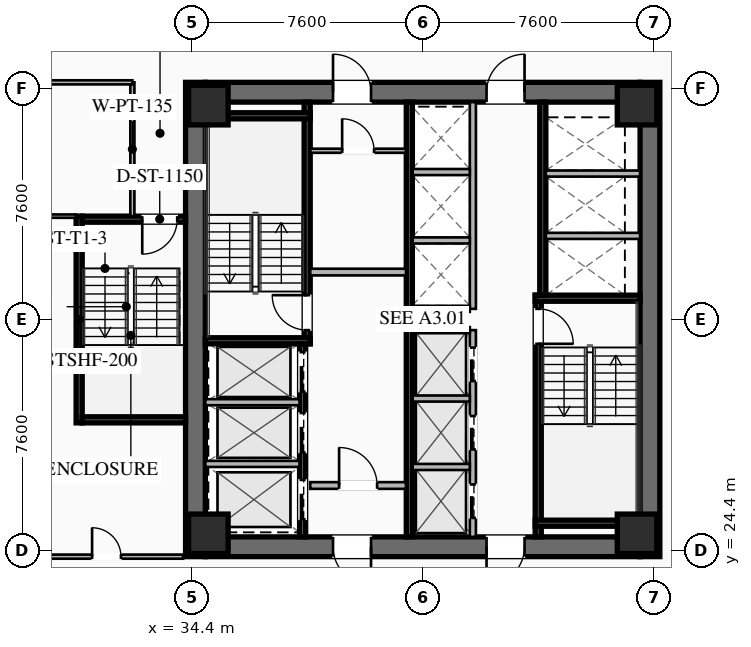
"""IFC4 building model, lengths in metres.
Left out: names, types, materials, properties, quantities, classifications, styles, units other than length and angle.
Written with IfcOpenShell. Run it as: python <this file> out.ifc"""

import sys

from ifc_helpers import new_model, si_unit, direction, frame, frame_2d, origin, origin_2d, place, context, subcontext, project, spatial, rectangle, hollow_rectangle, extrude, element, fill, save


model = new_model("IFC4")
c1 = context("Model", 3, precision=1e-05, world=origin(), true_north=direction((0.0, 1.0)))
c2 = subcontext(c1, "Body", "Model", "MODEL_VIEW")
j1 = project(units=[si_unit("LENGTHUNIT", "METRE"), si_unit("PLANEANGLEUNIT", "RADIAN")], contexts=[c1])
p1 = place(None, origin())
s1 = spatial("IfcSite", under=j1, at=p1, CompositionType="ELEMENT")
p2 = place(p1, origin())
s2 = spatial("IfcBuilding", under=s1, at=p2, CompositionType="ELEMENT")
p3 = place(p2, frame((0.0, 0.0, 35.25)))
s3 = spatial("IfcBuildingStorey", under=s2, at=p3, CompositionType="ELEMENT", Elevation=35.25)
for number, where, z_axis, x_axis in (
    (1, (34.525, 24.2, 0.0), (0.0, 0.0, 1.0), (0.0, 1.0, 0.0)),
    (2, (49.475, 39.8, 0.0), (0.0, 0.0, 1.0), (0.0, -1.0, 0.0)),
):
    element("IfcWall", number, at=place(p3, frame(where, z_axis=z_axis, x_axis=x_axis)), inside=s3, PredefinedType="SHEAR", context=c2, shape_type="SweptSolid", body=[
        extrude(rectangle(XDim=15.6, YDim=0.65, at=frame_2d((7.8, 0.0))), origin(), (0.0, 0.0, 1.0), 3.55),
    ])
p4 = place(p3, frame((49.15, 24.525, 0.0), z_axis=(0.0, 0.0, 1.0), x_axis=(-1.0, 0.0, 0.0)))
e3 = element("IfcWall", 3, at=p4, inside=s3, PredefinedType="SHEAR", context=c2, shape_type="SweptSolid", body=[
    extrude(rectangle(XDim=14.3, YDim=0.65, at=frame_2d((7.15, 0.0))), origin(), (0.0, 0.0, 1.0), 3.55),
])
p5 = place(p4, frame((8.85, 0.0, 0.0)))
e4 = element("IfcOpeningElement", 4, at=p5, cuts=e3, PredefinedType="OPENING", context=c2, shape_type="SweptSolid", body=[
    extrude(rectangle(XDim=1.25, YDim=2.25, at=frame_2d((0.625, 1.125))), frame((0.0, 0.335, 0.0), z_axis=(0.0, -1.0, 0.0), x_axis=(1.0, 0.0, 0.0)), (0.0, 0.0, 1.0), 0.67),
])
p6 = place(p4, frame((3.8, 0.0, 0.0)))
e5 = element("IfcOpeningElement", 5, at=p6, cuts=e3, PredefinedType="OPENING", context=c2, shape_type="SweptSolid", body=[
    extrude(rectangle(XDim=1.25, YDim=2.25, at=frame_2d((0.625, 1.125))), frame((0.0, 0.335, 0.0), z_axis=(0.0, -1.0, 0.0), x_axis=(1.0, 0.0, 0.0)), (0.0, 0.0, 1.0), 0.67),
])
p7 = place(p3, frame((34.85, 39.475, 0.0), z_axis=(0.0, 0.0, 1.0), x_axis=(1.0, 0.0, 0.0)))
e6 = element("IfcWall", 6, at=p7, inside=s3, PredefinedType="SHEAR", context=c2, shape_type="SweptSolid", body=[
    extrude(rectangle(XDim=14.3, YDim=0.65, at=frame_2d((7.15, 0.0))), origin(), (0.0, 0.0, 1.0), 3.55),
])
p8 = place(p7, frame((4.2, 0.0, 0.0)))
e7 = element("IfcOpeningElement", 7, at=p8, cuts=e6, PredefinedType="OPENING", context=c2, shape_type="SweptSolid", body=[
    extrude(rectangle(XDim=1.25, YDim=2.25, at=frame_2d((0.625, 1.125))), frame((0.0, 0.335, 0.0), z_axis=(0.0, -1.0, 0.0), x_axis=(1.0, 0.0, 0.0)), (0.0, 0.0, 1.0), 0.67),
])
p9 = place(p7, frame((9.25, 0.0, 0.0)))
e8 = element("IfcOpeningElement", 8, at=p9, cuts=e6, PredefinedType="OPENING", context=c2, shape_type="SweptSolid", body=[
    extrude(rectangle(XDim=1.25, YDim=2.25, at=frame_2d((0.625, 1.125))), frame((0.0, 0.335, 0.0), z_axis=(0.0, -1.0, 0.0), x_axis=(1.0, 0.0, 0.0)), (0.0, 0.0, 1.0), 0.67),
])
for number, where, z_axis, x_axis in (
    (9, (34.95, 24.95, 0.0), (0.0, 0.0, 1.0), (1.0, 0.0, 0.0)),
    (10, (49.05, 24.95, 0.0), (0.0, 0.0, 1.0), (1.0, 0.0, 0.0)),
    (11, (49.05, 39.05, 0.0), (0.0, 0.0, 1.0), (1.0, 0.0, 0.0)),
    (12, (34.95, 39.05, 0.0), (0.0, 0.0, 1.0), (1.0, 0.0, 0.0)),
):
    element("IfcColumn", number, at=place(p3, frame(where, z_axis=z_axis, x_axis=x_axis)), inside=s3, PredefinedType="COLUMN", context=c2, shape_type="SweptSolid", body=[
        extrude(hollow_rectangle(XDim=1.3, YDim=1.3, WallThickness=0.05, at=origin_2d()), origin(), (0.0, 0.0, 1.0), 3.35),
    ])
p10 = place(p3, frame((38.2, 31.2, 0.0), z_axis=(0.0, 0.0, 1.0), x_axis=(0.0, 1.0, 0.0)))
e13 = element("IfcWall", 13, at=p10, inside=s3, PredefinedType="SHEAR", context=c2, shape_type="SweptSolid", body=[
    extrude(rectangle(XDim=7.95, YDim=0.2, at=frame_2d((3.975, 0.0))), origin(), (0.0, 0.0, 1.0), 3.35),
])
p11 = place(p10, frame((0.45, 0.0, 0.0)))
e14 = element("IfcOpeningElement", 14, at=p11, cuts=e13, PredefinedType="OPENING", context=c2, shape_type="SweptSolid", body=[
    extrude(rectangle(XDim=1.15, YDim=2.2, at=frame_2d((0.575, 1.1))), frame((0.0, 0.11, 0.0), z_axis=(0.0, -1.0, 0.0), x_axis=(1.0, 0.0, 0.0)), (0.0, 0.0, 1.0), 0.22),
])
for number, where, z_axis, x_axis in (
    (15, (34.85, 31.3, 0.0), (0.0, 0.0, 1.0), (1.0, 0.0, 0.0)),
    (16, (34.85, 38.7, 0.0), (0.0, 0.0, 1.0), (1.0, 0.0, 0.0)),
):
    element("IfcWall", number, at=place(p3, frame(where, z_axis=z_axis, x_axis=x_axis)), inside=s3, PredefinedType="SHEAR", context=c2, shape_type="SweptSolid", body=[
        extrude(rectangle(XDim=3.45, YDim=0.2, at=frame_2d((1.725, 0.0))), origin(), (0.0, 0.0, 1.0), 3.35),
    ])
p12 = place(p3, frame((45.8, 32.8, 0.0), z_axis=(0.0, 0.0, 1.0), x_axis=(0.0, -1.0, 0.0)))
e17 = element("IfcWall", 17, at=p12, inside=s3, PredefinedType="SHEAR", context=c2, shape_type="SweptSolid", body=[
    extrude(rectangle(XDim=7.95, YDim=0.2, at=frame_2d((3.975, 0.0))), origin(), (0.0, 0.0, 1.0), 3.35),
])
p13 = place(p12, frame((0.45, 0.0, 0.0)))
e18 = element("IfcOpeningElement", 18, at=p13, cuts=e17, PredefinedType="OPENING", context=c2, shape_type="SweptSolid", body=[
    extrude(rectangle(XDim=1.15, YDim=2.2, at=frame_2d((0.575, 1.1))), frame((0.0, 0.11, 0.0), z_axis=(0.0, -1.0, 0.0), x_axis=(1.0, 0.0, 0.0)), (0.0, 0.0, 1.0), 0.22),
])
for number, where, z_axis, x_axis in (
    (19, (45.7, 32.7, 0.0), (0.0, 0.0, 1.0), (1.0, 0.0, 0.0)),
    (20, (45.7, 25.3, 0.0), (0.0, 0.0, 1.0), (1.0, 0.0, 0.0)),
):
    element("IfcWall", number, at=place(p3, frame(where, z_axis=z_axis, x_axis=x_axis)), inside=s3, PredefinedType="SHEAR", context=c2, shape_type="SweptSolid", body=[
        extrude(rectangle(XDim=3.45, YDim=0.2, at=frame_2d((1.725, 0.0))), origin(), (0.0, 0.0, 1.0), 3.35),
    ])
p14 = place(p3, frame((41.56, 24.85, 0.0), z_axis=(0.0, 0.0, 1.0), x_axis=(0.0, 1.0, 0.0)))
e21 = element("IfcWall", 21, at=p14, inside=s3, PredefinedType="SHEAR", context=c2, shape_type="SweptSolid", body=[
    extrude(rectangle(XDim=14.3, YDim=0.2, at=frame_2d((7.15, 0.0))), origin(), (0.0, 0.0, 1.0), 3.35),
])
p15 = place(p3, frame((38.3, 33.56, 0.0), z_axis=(0.0, 0.0, 1.0), x_axis=(1.0, 0.0, 0.0)))
e22 = element("IfcWall", 22, at=p15, inside=s3, PredefinedType="SOLIDWALL", context=c2, shape_type="SweptSolid", body=[
    extrude(rectangle(XDim=3.15, YDim=0.22, at=frame_2d((1.575, 0.0))), origin(), (0.0, 0.0, 1.0), 2.703),
])
p16 = place(p3, frame((38.3, 26.54, 0.0), z_axis=(0.0, 0.0, 1.0), x_axis=(1.0, 0.0, 0.0)))
e23 = element("IfcWall", 23, at=p16, inside=s3, PredefinedType="SOLIDWALL", context=c2, shape_type="SweptSolid", body=[
    extrude(rectangle(XDim=3.15, YDim=0.22, at=frame_2d((1.575, 0.0))), origin(), (0.0, 0.0, 1.0), 2.703),
])
p17 = place(p16, frame((0.95, 0.0, 0.0)))
e24 = element("IfcOpeningElement", 24, at=p17, cuts=e23, PredefinedType="OPENING", context=c2, shape_type="SweptSolid", body=[
    extrude(rectangle(XDim=1.25, YDim=2.25, at=frame_2d((0.625, 1.125))), frame((0.0, 0.12, 0.0), z_axis=(0.0, -1.0, 0.0), x_axis=(1.0, 0.0, 0.0)), (0.0, 0.0, 1.0), 0.24),
])
p18 = place(p3, frame((38.05, 24.85, 0.0), z_axis=(0.0, 0.0, 1.0), x_axis=(0.0, 1.0, 0.0)))
e25 = element("IfcWall", 25, at=p18, inside=s3, PredefinedType="SHEAR", context=c2, shape_type="SweptSolid", body=[
    extrude(rectangle(XDim=6.35, YDim=0.2, at=frame_2d((3.175, 0.0))), origin(), (0.0, 0.0, 1.0), 3.35),
])
p19 = place(p18, frame((4.775, 0.0, 0.0)))
e26 = element("IfcOpeningElement", 26, at=p19, cuts=e25, PredefinedType="OPENING", context=c2, shape_type="SweptSolid", body=[
    extrude(rectangle(XDim=1.3, YDim=2.25, at=frame_2d((0.65, 1.125))), frame((0.0, 0.11, 0.0), z_axis=(0.0, -1.0, 0.0), x_axis=(1.0, 0.0, 0.0)), (0.0, 0.0, 1.0), 0.22),
])
p20 = place(p18, frame((2.775, 0.0, 0.0)))
e27 = element("IfcOpeningElement", 27, at=p20, cuts=e25, PredefinedType="OPENING", context=c2, shape_type="SweptSolid", body=[
    extrude(rectangle(XDim=1.3, YDim=2.25, at=frame_2d((0.65, 1.125))), frame((0.0, 0.11, 0.0), z_axis=(0.0, -1.0, 0.0), x_axis=(1.0, 0.0, 0.0)), (0.0, 0.0, 1.0), 0.22),
])
p21 = place(p18, frame((0.575, 0.0, 0.0)))
e28 = element("IfcOpeningElement", 28, at=p21, cuts=e25, PredefinedType="OPENING", context=c2, shape_type="SweptSolid", body=[
    extrude(rectangle(XDim=1.3, YDim=2.25, at=frame_2d((0.65, 1.125))), frame((0.0, 0.11, 0.0), z_axis=(0.0, -1.0, 0.0), x_axis=(1.0, 0.0, 0.0)), (0.0, 0.0, 1.0), 0.22),
])
for number, where, z_axis, x_axis in (
    (29, (34.85, 27.25, 0.0), (0.0, 0.0, 1.0), (1.0, 0.0, 0.0)),
    (30, (34.85, 29.28, 0.0), (0.0, 0.0, 1.0), (1.0, 0.0, 0.0)),
):
    element("IfcWall", number, at=place(p3, frame(where, z_axis=z_axis, x_axis=x_axis)), inside=s3, PredefinedType="SOLIDWALL", context=c2, shape_type="SweptSolid", body=[
        extrude(rectangle(XDim=3.1, YDim=0.2, at=frame_2d((1.55, 0.0))), origin(), (0.0, 0.0, 1.0), 3.35),
    ])
p22 = place(p3, frame((45.95, 39.15, 0.0), z_axis=(0.0, 0.0, 1.0), x_axis=(0.0, -1.0, 0.0)))
e31 = element("IfcWall", 31, at=p22, inside=s3, PredefinedType="SHEAR", context=c2, shape_type="SweptSolid", body=[
    extrude(rectangle(XDim=6.35, YDim=0.2, at=frame_2d((3.175, 0.0))), origin(), (0.0, 0.0, 1.0), 3.35),
])
for number, where, z_axis, x_axis in (
    (32, (46.05, 34.75, 0.0), (0.0, 0.0, 1.0), (1.0, 0.0, 0.0)),
    (33, (46.05, 36.8, 0.0), (0.0, 0.0, 1.0), (1.0, 0.0, 0.0)),
):
    element("IfcWall", number, at=place(p3, frame(where, z_axis=z_axis, x_axis=x_axis)), inside=s3, PredefinedType="SOLIDWALL", context=c2, shape_type="SweptSolid", body=[
        extrude(rectangle(XDim=3.1, YDim=0.2, at=frame_2d((1.55, 0.0))), origin(), (0.0, 0.0, 1.0), 3.35),
    ])
p23 = place(p3, frame((38.3, 37.55, 0.0), z_axis=(0.0, 0.0, 1.0), x_axis=(1.0, 0.0, 0.0)))
e34 = element("IfcWall", 34, at=p23, inside=s3, PredefinedType="PARTITIONING", context=c2, shape_type="SweptSolid", body=[
    extrude(rectangle(XDim=3.15, YDim=0.135, at=frame_2d((1.575, 0.0))), origin(), (0.0, 0.0, 1.0), 2.703),
])
p24 = place(p23, frame((1.05, 0.0, 0.0)))
e35 = element("IfcOpeningElement", 35, at=p24, cuts=e34, PredefinedType="OPENING", context=c2, shape_type="SweptSolid", body=[
    extrude(rectangle(XDim=1.05, YDim=2.2, at=frame_2d((0.525, 1.1))), frame((0.0, 0.077, 0.0), z_axis=(0.0, -1.0, 0.0), x_axis=(1.0, 0.0, 0.0)), (0.0, 0.0, 1.0), 0.155),
])
p25 = place(p3, frame((43.65, 24.85, 0.0), z_axis=(0.0, 0.0, 1.0), x_axis=(0.0, 1.0, 0.0)))
e36 = element("IfcWall", 36, at=p25, inside=s3, PredefinedType="SOLIDWALL", context=c2, shape_type="SweptSolid", body=[
    extrude(rectangle(XDim=6.8, YDim=0.2, at=frame_2d((3.4, 0.0))), origin(), (0.0, 0.0, 1.0), 3.35),
])
p26 = place(p25, frame((0.625, 0.0, 0.0)))
e37 = element("IfcOpeningElement", 37, at=p26, cuts=e36, PredefinedType="OPENING", context=c2, shape_type="SweptSolid", body=[
    extrude(rectangle(XDim=1.1, YDim=2.2, at=frame_2d((0.55, 1.1))), frame((0.0, 0.11, 0.0), z_axis=(0.0, -1.0, 0.0), x_axis=(1.0, 0.0, 0.0)), (0.0, 0.0, 1.0), 0.22),
])
p27 = place(p25, frame((2.875, 0.0, 0.0)))
e38 = element("IfcOpeningElement", 38, at=p27, cuts=e36, PredefinedType="OPENING", context=c2, shape_type="SweptSolid", body=[
    extrude(rectangle(XDim=1.1, YDim=2.2, at=frame_2d((0.55, 1.1))), frame((0.0, 0.11, 0.0), z_axis=(0.0, -1.0, 0.0), x_axis=(1.0, 0.0, 0.0)), (0.0, 0.0, 1.0), 0.22),
])
p28 = place(p25, frame((5.125, 0.0, 0.0)))
e39 = element("IfcOpeningElement", 39, at=p28, cuts=e36, PredefinedType="OPENING", context=c2, shape_type="SweptSolid", body=[
    extrude(rectangle(XDim=1.1, YDim=2.2, at=frame_2d((0.55, 1.1))), frame((0.0, 0.11, 0.0), z_axis=(0.0, -1.0, 0.0), x_axis=(1.0, 0.0, 0.0)), (0.0, 0.0, 1.0), 0.22),
])
for number, where, z_axis, x_axis in (
    (40, (41.67, 27.15, 0.0), (0.0, 0.0, 1.0), (1.0, 0.0, 0.0)),
    (41, (41.67, 29.4, 0.0), (0.0, 0.0, 1.0), (1.0, 0.0, 0.0)),
    (42, (41.67, 31.65, 0.0), (0.0, 0.0, 1.0), (1.0, 0.0, 0.0)),
):
    element("IfcWall", number, at=place(p3, frame(where, z_axis=z_axis, x_axis=x_axis)), inside=s3, PredefinedType="SOLIDWALL", context=c2, shape_type="SweptSolid", body=[
        extrude(rectangle(XDim=1.88, YDim=0.2, at=frame_2d((0.94, 0.0))), origin(), (0.0, 0.0, 1.0), 3.35),
    ])
p29 = place(p3, frame((43.65, 32.35, 0.0), z_axis=(0.0, 0.0, 1.0), x_axis=(0.0, 1.0, 0.0)))
e43 = element("IfcWall", 43, at=p29, inside=s3, PredefinedType="SOLIDWALL", context=c2, shape_type="SweptSolid", body=[
    extrude(rectangle(XDim=6.8, YDim=0.2, at=frame_2d((3.4, 0.0))), origin(), (0.0, 0.0, 1.0), 3.35),
])
for number, where, z_axis, x_axis in (
    (44, (41.67, 32.35, 0.0), (0.0, 0.0, 1.0), (1.0, 0.0, 0.0)),
    (45, (41.67, 34.6, 0.0), (0.0, 0.0, 1.0), (1.0, 0.0, 0.0)),
    (46, (41.67, 36.85, 0.0), (0.0, 0.0, 1.0), (1.0, 0.0, 0.0)),
):
    element("IfcWall", number, at=place(p3, frame(where, z_axis=z_axis, x_axis=x_axis)), inside=s3, PredefinedType="SOLIDWALL", context=c2, shape_type="SweptSolid", body=[
        extrude(rectangle(XDim=1.88, YDim=0.2, at=frame_2d((0.94, 0.0))), origin(), (0.0, 0.0, 1.0), 3.35),
    ])
p30 = place(p3, frame((30.7, 28.6, 0.0), z_axis=(0.0, 0.0, 1.0), x_axis=(0.0, 1.0, 0.0)))
e47 = element("IfcWall", 47, at=p30, inside=s3, PredefinedType="SHEAR", context=c2, shape_type="SweptSolid", body=[
    extrude(rectangle(XDim=6.8, YDim=0.2, at=frame_2d((3.4, 0.0))), origin(), (0.0, 0.0, 1.0), 3.35),
])
p31 = place(p3, frame((34.2, 35.3, 0.0), z_axis=(0.0, 0.0, 1.0), x_axis=(-1.0, 0.0, 0.0)))
e48 = element("IfcWall", 48, at=p31, inside=s3, PredefinedType="SHEAR", context=c2, shape_type="SweptSolid", body=[
    extrude(rectangle(XDim=3.4, YDim=0.2, at=frame_2d((1.7, 0.0))), origin(), (0.0, 0.0, 1.0), 3.35),
])
p32 = place(p31, frame((0.275, 0.0, 0.0)))
e49 = element("IfcOpeningElement", 49, at=p32, cuts=e48, PredefinedType="OPENING", context=c2, shape_type="SweptSolid", body=[
    extrude(rectangle(XDim=1.15, YDim=2.2, at=frame_2d((0.575, 1.1))), frame((0.0, 0.11, 0.0), z_axis=(0.0, -1.0, 0.0), x_axis=(1.0, 0.0, 0.0)), (0.0, 0.0, 1.0), 0.22),
])
p33 = place(p3, frame((30.8, 28.7, 0.0), z_axis=(0.0, 0.0, 1.0), x_axis=(1.0, 0.0, 0.0)))
e50 = element("IfcWall", 50, at=p33, inside=s3, PredefinedType="SHEAR", context=c2, shape_type="SweptSolid", body=[
    extrude(rectangle(XDim=3.4, YDim=0.2, at=frame_2d((1.7, 0.0))), origin(), (0.0, 0.0, 1.0), 3.35),
])
p34 = place(p3, frame((32.45, 35.4, 0.0), z_axis=(0.0, 0.0, 1.0), x_axis=(0.0, 1.0, 0.0)))
e51 = element("IfcWall", 51, at=p34, inside=s3, PredefinedType="PARTITIONING", context=c2, shape_type="SweptSolid", body=[
    extrude(rectangle(XDim=4.4, YDim=0.135, at=frame_2d((2.2, 0.0))), origin(), (0.0, 0.0, 1.0), 2.703),
])
p35 = place(p3, frame((32.45, 39.8, 0.0), z_axis=(0.0, 0.0, 1.0), x_axis=(-1.0, 0.0, 0.0)))
e52 = element("IfcWall", 52, at=p35, inside=s3, PredefinedType="PARTITIONING", context=c2, shape_type="SweptSolid", body=[
    extrude(rectangle(XDim=13.33, YDim=0.135, at=frame_2d((6.665, 0.0))), origin(), (0.0, 0.0, 1.0), 2.703),
])
p36 = place(p35, frame((5.84, 0.0, 0.0)))
e53 = element("IfcOpeningElement", 53, at=p36, cuts=e52, PredefinedType="OPENING", context=c2, shape_type="SweptSolid", body=[
    extrude(rectangle(XDim=0.95, YDim=2.05, at=frame_2d((0.475, 1.025))), frame((0.0, 0.077, 0.0), z_axis=(0.0, -1.0, 0.0), x_axis=(1.0, 0.0, 0.0)), (0.0, 0.0, 1.0), 0.155),
])
p37 = place(p3, frame((19.12, 24.2, 0.0), z_axis=(0.0, 0.0, 1.0), x_axis=(1.0, 0.0, 0.0)))
e54 = element("IfcWall", 54, at=p37, inside=s3, PredefinedType="PARTITIONING", context=c2, shape_type="SweptSolid", body=[
    extrude(rectangle(XDim=15.0, YDim=0.135, at=frame_2d((7.5, 0.0))), origin(), (0.0, 0.0, 1.0), 2.703),
])
p38 = place(p37, frame((12.005, 0.0, 0.0)))
e55 = element("IfcOpeningElement", 55, at=p38, cuts=e54, PredefinedType="OPENING", context=c2, shape_type="SweptSolid", body=[
    extrude(rectangle(XDim=0.95, YDim=2.05, at=frame_2d((0.475, 1.025))), frame((0.0, 0.077, 0.0), z_axis=(0.0, -1.0, 0.0), x_axis=(1.0, 0.0, 0.0)), (0.0, 0.0, 1.0), 0.155),
])
p39 = place(p3, frame((30.6, 35.4, 0.0), z_axis=(0.0, 0.0, 1.0), x_axis=(-1.0, 0.0, 0.0)))
e56 = element("IfcWall", 56, at=p39, inside=s3, PredefinedType="PARTITIONING", context=c2, shape_type="SweptSolid", body=[
    extrude(rectangle(XDim=11.48, YDim=0.11, at=frame_2d((5.74, 0.0))), origin(), (0.0, 0.0, 1.0), 2.703),
])
p40 = place(p8, origin())
e57 = element("IfcDoor", 57, at=p40, inside=s3, OperationType="SINGLE_SWING_LEFT", PredefinedType="DOOR", context=c2, shape_type="SweptSolid", body=[
    extrude(rectangle(XDim=1.25, YDim=2.25, at=frame_2d((0.625, 1.125))), frame((0.0, 0.025, 0.0), z_axis=(0.0, -1.0, 0.0), x_axis=(1.0, 0.0, 0.0)), (0.0, 0.0, 1.0), 0.05),
])
fill(e7, e57)
p41 = place(p9, origin())
e58 = element("IfcDoor", 58, at=p41, inside=s3, OperationType="SINGLE_SWING_RIGHT", PredefinedType="DOOR", context=c2, shape_type="SweptSolid", body=[
    extrude(rectangle(XDim=1.25, YDim=2.25, at=frame_2d((0.625, 1.125))), frame((0.0, 0.025, 0.0), z_axis=(0.0, -1.0, 0.0), x_axis=(1.0, 0.0, 0.0)), (0.0, 0.0, 1.0), 0.05),
])
fill(e8, e58)
p42 = place(p5, origin())
e59 = element("IfcDoor", 59, at=p42, inside=s3, OperationType="SINGLE_SWING_LEFT", PredefinedType="DOOR", context=c2, shape_type="SweptSolid", body=[
    extrude(rectangle(XDim=1.25, YDim=2.25, at=frame_2d((0.625, 1.125))), frame((0.0, 0.025, 0.0), z_axis=(0.0, -1.0, 0.0), x_axis=(1.0, 0.0, 0.0)), (0.0, 0.0, 1.0), 0.05),
])
fill(e4, e59)
p43 = place(p6, origin())
e60 = element("IfcDoor", 60, at=p43, inside=s3, OperationType="SINGLE_SWING_RIGHT", PredefinedType="DOOR", context=c2, shape_type="SweptSolid", body=[
    extrude(rectangle(XDim=1.25, YDim=2.25, at=frame_2d((0.625, 1.125))), frame((0.0, 0.025, 0.0), z_axis=(0.0, -1.0, 0.0), x_axis=(1.0, 0.0, 0.0)), (0.0, 0.0, 1.0), 0.05),
])
fill(e5, e60)
p44 = place(p11, origin())
e61 = element("IfcDoor", 61, at=p44, inside=s3, OperationType="SINGLE_SWING_RIGHT", PredefinedType="DOOR", context=c2, shape_type="SweptSolid", body=[
    extrude(rectangle(XDim=1.15, YDim=2.2, at=frame_2d((0.575, 1.1))), frame((0.0, 0.025, 0.0), z_axis=(0.0, -1.0, 0.0), x_axis=(1.0, 0.0, 0.0)), (0.0, 0.0, 1.0), 0.05),
])
fill(e14, e61)
p45 = place(p13, origin())
e62 = element("IfcDoor", 62, at=p45, inside=s3, OperationType="SINGLE_SWING_RIGHT", PredefinedType="DOOR", context=c2, shape_type="SweptSolid", body=[
    extrude(rectangle(XDim=1.15, YDim=2.2, at=frame_2d((0.575, 1.1))), frame((0.0, 0.025, 0.0), z_axis=(0.0, -1.0, 0.0), x_axis=(1.0, 0.0, 0.0)), (0.0, 0.0, 1.0), 0.05),
])
fill(e18, e62)
p46 = place(p17, origin())
e63 = element("IfcDoor", 63, at=p46, inside=s3, OperationType="SINGLE_SWING_LEFT", PredefinedType="DOOR", context=c2, shape_type="SweptSolid", body=[
    extrude(rectangle(XDim=1.25, YDim=2.25, at=frame_2d((0.625, 1.125))), frame((0.0, 0.025, 0.0), z_axis=(0.0, -1.0, 0.0), x_axis=(1.0, 0.0, 0.0)), (0.0, 0.0, 1.0), 0.05),
])
fill(e24, e63)
p47 = place(p24, origin())
e64 = element("IfcDoor", 64, at=p47, inside=s3, OperationType="SINGLE_SWING_LEFT", PredefinedType="DOOR", context=c2, shape_type="SweptSolid", body=[
    extrude(rectangle(XDim=1.05, YDim=2.2, at=frame_2d((0.525, 1.1))), frame((0.0, 0.025, 0.0), z_axis=(0.0, -1.0, 0.0), x_axis=(1.0, 0.0, 0.0)), (0.0, 0.0, 1.0), 0.05),
])
fill(e35, e64)
p48 = place(p32, origin())
e65 = element("IfcDoor", 65, at=p48, inside=s3, OperationType="SINGLE_SWING_RIGHT", PredefinedType="DOOR", context=c2, shape_type="SweptSolid", body=[
    extrude(rectangle(XDim=1.15, YDim=2.2, at=frame_2d((0.575, 1.1))), frame((0.0, 0.025, 0.0), z_axis=(0.0, -1.0, 0.0), x_axis=(1.0, 0.0, 0.0)), (0.0, 0.0, 1.0), 0.05),
])
fill(e49, e65)
p49 = place(p38, origin())
e66 = element("IfcDoor", 66, at=p49, inside=s3, OperationType="SINGLE_SWING_LEFT", PredefinedType="DOOR", context=c2, shape_type="SweptSolid", body=[
    extrude(rectangle(XDim=0.95, YDim=2.05, at=frame_2d((0.475, 1.025))), frame((0.0, 0.025, 0.0), z_axis=(0.0, -1.0, 0.0), x_axis=(1.0, 0.0, 0.0)), (0.0, 0.0, 1.0), 0.05),
])
fill(e55, e66)
p50 = place(p19, origin())
e67 = element("IfcDoor", 67, at=p50, inside=s3, OperationType="SLIDING_TO_LEFT", PredefinedType="DOOR", context=c2, shape_type="SweptSolid", body=[
    extrude(rectangle(XDim=1.3, YDim=2.25, at=frame_2d((0.65, 1.125))), frame((0.0, 0.025, 0.0), z_axis=(0.0, -1.0, 0.0), x_axis=(1.0, 0.0, 0.0)), (0.0, 0.0, 1.0), 0.05),
])
fill(e26, e67)
p51 = place(p20, origin())
e68 = element("IfcDoor", 68, at=p51, inside=s3, OperationType="SLIDING_TO_LEFT", PredefinedType="DOOR", context=c2, shape_type="SweptSolid", body=[
    extrude(rectangle(XDim=1.3, YDim=2.25, at=frame_2d((0.65, 1.125))), frame((0.0, 0.025, 0.0), z_axis=(0.0, -1.0, 0.0), x_axis=(1.0, 0.0, 0.0)), (0.0, 0.0, 1.0), 0.05),
])
fill(e27, e68)
p52 = place(p21, origin())
e69 = element("IfcDoor", 69, at=p52, inside=s3, OperationType="SLIDING_TO_LEFT", PredefinedType="DOOR", context=c2, shape_type="SweptSolid", body=[
    extrude(rectangle(XDim=1.3, YDim=2.25, at=frame_2d((0.65, 1.125))), frame((0.0, 0.025, 0.0), z_axis=(0.0, -1.0, 0.0), x_axis=(1.0, 0.0, 0.0)), (0.0, 0.0, 1.0), 0.05),
])
fill(e28, e69)
p53 = place(p26, origin())
e70 = element("IfcDoor", 70, at=p53, inside=s3, OperationType="SLIDING_TO_LEFT", PredefinedType="DOOR", context=c2, shape_type="SweptSolid", body=[
    extrude(rectangle(XDim=1.1, YDim=2.2, at=frame_2d((0.55, 1.1))), frame((0.0, 0.025, 0.0), z_axis=(0.0, -1.0, 0.0), x_axis=(1.0, 0.0, 0.0)), (0.0, 0.0, 1.0), 0.05),
])
fill(e37, e70)
p54 = place(p27, origin())
e71 = element("IfcDoor", 71, at=p54, inside=s3, OperationType="SLIDING_TO_LEFT", PredefinedType="DOOR", context=c2, shape_type="SweptSolid", body=[
    extrude(rectangle(XDim=1.1, YDim=2.2, at=frame_2d((0.55, 1.1))), frame((0.0, 0.025, 0.0), z_axis=(0.0, -1.0, 0.0), x_axis=(1.0, 0.0, 0.0)), (0.0, 0.0, 1.0), 0.05),
])
fill(e38, e71)
p55 = place(p28, origin())
e72 = element("IfcDoor", 72, at=p55, inside=s3, OperationType="SLIDING_TO_LEFT", PredefinedType="DOOR", context=c2, shape_type="SweptSolid", body=[
    extrude(rectangle(XDim=1.1, YDim=2.2, at=frame_2d((0.55, 1.1))), frame((0.0, 0.025, 0.0), z_axis=(0.0, -1.0, 0.0), x_axis=(1.0, 0.0, 0.0)), (0.0, 0.0, 1.0), 0.05),
])
fill(e39, e72)
save(model, sys.argv[1])
